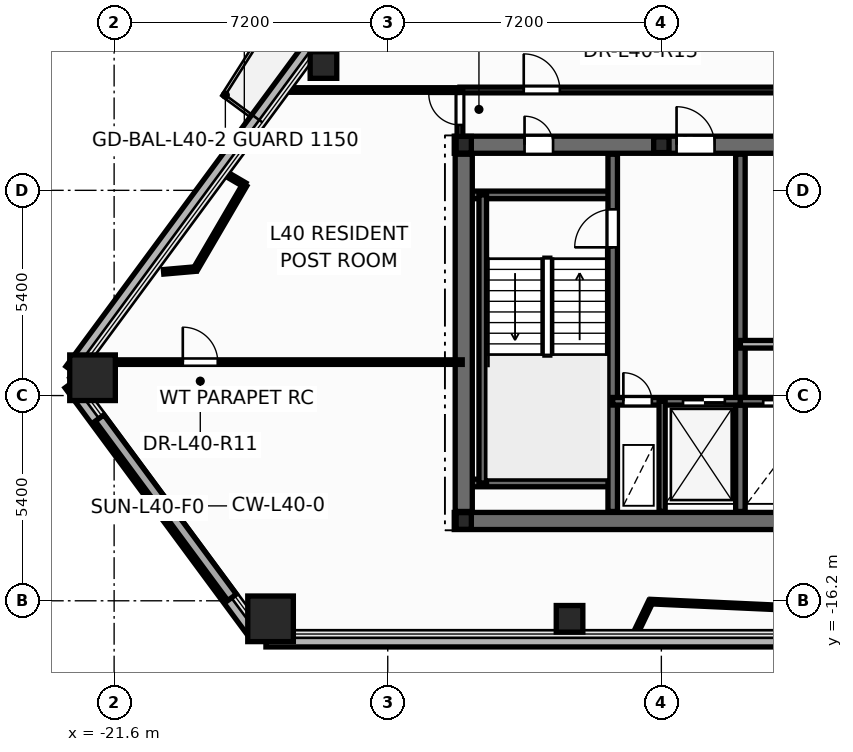
"""IFC4 building model, lengths in metres.
Left out: names, types, materials, properties, quantities, classifications, styles, units other than length and angle.
Written with IfcOpenShell. Run it as: python <this file> out.ifc"""

import sys

from ifc_helpers import new_model, si_unit, direction, frame, frame_2d, origin, origin_2d, place, context, subcontext, project, spatial, rectangle, hollow_rectangle, hollow_circle, i_section, extrude, element, fill, save


model = new_model("IFC4")
c1 = context("Model", 3, precision=1e-05, world=origin(), true_north=direction((0.0, 1.0)))
c2 = subcontext(c1, "Body", "Model", "MODEL_VIEW")
j1 = project(units=[si_unit("LENGTHUNIT", "METRE"), si_unit("PLANEANGLEUNIT", "RADIAN")], contexts=[c1])
p1 = place(None, origin())
s1 = spatial("IfcSite", under=j1, at=p1, CompositionType="ELEMENT")
p2 = place(p1, origin())
s2 = spatial("IfcBuilding", under=s1, at=p2, CompositionType="ELEMENT")
p3 = place(p2, frame((0.0, 0.0, 154.5)))
s3 = spatial("IfcBuildingStorey", under=s2, at=p3, CompositionType="ELEMENT", Elevation=154.5)
for number, where, z_axis, x_axis in (
    (1, (-22.168, -10.331, 0.0), (0.0, 0.0, 1.0), (1.0, 0.0, 0.0)),
    (2, (-17.484, -16.674, 0.0), (0.0, 0.0, 1.0), (1.0, 0.0, 0.0)),
):
    element("IfcColumn", number, at=place(p3, frame(where, z_axis=z_axis, x_axis=x_axis)), inside=s3, PredefinedType="COLUMN", context=c2, shape_type="SweptSolid", body=[
        extrude(hollow_rectangle(XDim=1.2, YDim=1.2, WallThickness=0.055, at=origin_2d()), origin(), (0.0, 0.0, 1.0), 3.6),
    ])
for number, where, z_axis, x_axis in (
    (3, (-9.616, -16.674, 0.0), (0.0, 0.0, 1.0), (1.0, 0.0, 0.0)),
    (4, (-16.092, -2.103, 0.0), (0.0, 0.0, 1.0), (1.0, 0.0, 0.0)),
):
    element("IfcColumn", number, at=place(p3, frame(where, z_axis=z_axis, x_axis=x_axis)), inside=s3, PredefinedType="COLUMN", context=c2, shape_type="SweptSolid", body=[
        extrude(hollow_circle(Radius=0.35, WallThickness=0.03, at=origin_2d()), origin(), (0.0, 0.0, 1.0), 3.6),
    ])
for number, where, z_axis, x_axis in (
    (5, (-12.4, -14.1, 0.0), (0.0, 0.0, 1.0), (1.0, 0.0, 0.0)),
    (6, (-12.4, -4.2, 0.0), (0.0, 0.0, 1.0), (1.0, 0.0, 0.0)),
):
    element("IfcColumn", number, at=place(p3, frame(where, z_axis=z_axis, x_axis=x_axis)), inside=s3, PredefinedType="COLUMN", context=c2, shape_type="SweptSolid", body=[
        extrude(i_section(OverallWidth=0.4, OverallDepth=0.44, WebThickness=0.028, FlangeThickness=0.04, at=origin_2d()), origin(), (0.0, 0.0, 1.0), 3.6),
    ])
p4 = place(p3, frame((-7.2, -4.2, 0.0), z_axis=(0.0, 0.0, 1.0), x_axis=(1.0, 0.0, 0.0)))
e7 = element("IfcColumn", 7, at=p4, inside=s3, PredefinedType="PILASTER", context=c2, shape_type="SweptSolid", body=[
    extrude(i_section(OverallWidth=0.405, OverallDepth=0.414, WebThickness=0.022, FlangeThickness=0.032, at=origin_2d()), origin(), (0.0, 0.0, 1.0), 3.6),
])
p5 = place(p3, frame((-22.747, -10.49, -0.2), z_axis=(0.0, 0.0, 1.0), x_axis=(0.594078793351, -0.804406854328, 0.0)))
e8 = element("IfcWall", 8, at=p5, inside=s3, PredefinedType="PARAPET", context=c2, shape_type="SweptSolid", body=[
    extrude(rectangle(XDim=8.223, YDim=0.36, at=frame_2d((4.111, 0.0))), origin(), (0.0, 0.0, 1.0), 0.38),
])
p6 = place(p3, frame((-17.605, -17.234, -0.2), z_axis=(0.0, 0.0, 1.0), x_axis=(1.0, 0.0, 0.0)))
e9 = element("IfcWall", 9, at=p6, inside=s3, PredefinedType="PARAPET", context=c2, shape_type="SweptSolid", body=[
    extrude(rectangle(XDim=35.211, YDim=0.36, at=frame_2d((17.605, 0.0))), origin(), (0.0, 0.0, 1.0), 0.38),
])
p7 = place(p3, frame((-13.883, 1.83, -0.2), z_axis=(0.0, 0.0, 1.0), x_axis=(-0.594082392526, -0.804404196216, 0.0)))
e10 = element("IfcWall", 10, at=p7, inside=s3, PredefinedType="PARAPET", context=c2, shape_type="SweptSolid", body=[
    extrude(rectangle(XDim=14.88, YDim=0.36, at=frame_2d((7.44, 0.0))), origin(), (0.0, 0.0, 1.0), 0.38),
])
p8 = place(p3, frame((-12.65, -14.1, 0.0), z_axis=(0.0, 0.0, 1.0), x_axis=(1.0, 0.0, 0.0)))
e11 = element("IfcWall", 11, at=p8, inside=s3, PredefinedType="SHEAR", context=c2, shape_type="SweptSolid", body=[
    extrude(rectangle(XDim=25.3, YDim=0.45, at=frame_2d((12.65, 0.0))), origin(), (0.0, 0.0, 1.0), 3.6),
])
p9 = place(p3, frame((-12.65, -4.2, 0.0), z_axis=(0.0, 0.0, 1.0), x_axis=(1.0, 0.0, 0.0)))
e12 = element("IfcWall", 12, at=p9, inside=s3, PredefinedType="SHEAR", context=c2, shape_type="SweptSolid", body=[
    extrude(rectangle(XDim=25.3, YDim=0.45, at=frame_2d((12.65, 0.0))), origin(), (0.0, 0.0, 1.0), 3.6),
])
p10 = place(p9, frame((1.85, 0.0, 0.0)))
e13 = element("IfcOpeningElement", 13, at=p10, cuts=e12, PredefinedType="OPENING", context=c2, shape_type="SweptSolid", body=[
    extrude(rectangle(XDim=0.756, YDim=2.054, at=frame_2d((0.375, 1.027))), frame((0.0, 0.235, 0.0), z_axis=(0.0, -1.0, 0.0), x_axis=(1.0, 0.0, 0.0)), (0.0, 0.0, 1.0), 0.47),
])
p11 = place(p9, frame((21.85, 0.0, 0.0)))
e14 = element("IfcOpeningElement", 14, at=p11, cuts=e12, PredefinedType="OPENING", context=c2, shape_type="SweptSolid", body=[
    extrude(rectangle(XDim=0.756, YDim=2.054, at=frame_2d((0.375, 1.027))), frame((0.0, 0.235, 0.0), z_axis=(0.0, -1.0, 0.0), x_axis=(1.0, 0.0, 0.0)), (0.0, 0.0, 1.0), 0.47),
])
p12 = place(p9, frame((23.5, 0.0, 0.0)))
e15 = element("IfcOpeningElement", 15, at=p12, cuts=e12, PredefinedType="OPENING", context=c2, shape_type="SweptSolid", body=[
    extrude(rectangle(XDim=0.756, YDim=2.054, at=frame_2d((0.375, 1.027))), frame((0.0, 0.235, 0.0), z_axis=(0.0, -1.0, 0.0), x_axis=(1.0, 0.0, 0.0)), (0.0, 0.0, 1.0), 0.47),
])
p13 = place(p9, frame((5.85, 0.0, 0.0)))
e16 = element("IfcOpeningElement", 16, at=p13, cuts=e12, PredefinedType="OPENING", context=c2, shape_type="SweptSolid", body=[
    extrude(rectangle(XDim=1.006, YDim=2.104, at=frame_2d((0.5, 1.052))), frame((0.0, 0.235, 0.0), z_axis=(0.0, -1.0, 0.0), x_axis=(1.0, 0.0, 0.0)), (0.0, 0.0, 1.0), 0.47),
])
p14 = place(p9, frame((10.35, 0.0, 0.0)))
e17 = element("IfcOpeningElement", 17, at=p14, cuts=e12, PredefinedType="OPENING", context=c2, shape_type="SweptSolid", body=[
    extrude(rectangle(XDim=1.406, YDim=2.154, at=frame_2d((0.7, 1.077))), frame((0.0, 0.235, 0.0), z_axis=(0.0, -1.0, 0.0), x_axis=(1.0, 0.0, 0.0)), (0.0, 0.0, 1.0), 0.47),
])
p15 = place(p9, frame((18.45, 0.0, 0.0)))
e18 = element("IfcOpeningElement", 18, at=p15, cuts=e12, PredefinedType="OPENING", context=c2, shape_type="SweptSolid", body=[
    extrude(rectangle(XDim=1.006, YDim=2.104, at=frame_2d((0.5, 1.052))), frame((0.0, 0.235, 0.0), z_axis=(0.0, -1.0, 0.0), x_axis=(1.0, 0.0, 0.0)), (0.0, 0.0, 1.0), 0.47),
])
for number, where, z_axis, x_axis in (
    (19, (-12.35, -5.52, 0.0), (0.0, 0.0, 1.0), (1.0, 0.0, 0.0)),
    (20, (-12.35, -13.1, 0.0), (0.0, 0.0, 1.0), (1.0, 0.0, 0.0)),
):
    element("IfcWall", number, at=place(p3, frame(where, z_axis=z_axis, x_axis=x_axis)), inside=s3, PredefinedType="SOLIDWALL", context=c2, shape_type="SweptSolid", body=[
        extrude(rectangle(XDim=3.87, YDim=0.2, at=frame_2d((1.935, 0.0))), origin(), (0.0, 0.0, 1.0), 3.6),
    ])
p16 = place(p3, frame((-11.9, -13.1, 0.0), z_axis=(0.0, 0.0, 1.0), x_axis=(0.0, 1.0, 0.0)))
e21 = element("IfcWall", 21, at=p16, inside=s3, PredefinedType="SOLIDWALL", context=c2, shape_type="SweptSolid", body=[
    extrude(rectangle(XDim=7.58, YDim=0.2, at=frame_2d((3.79, 0.0))), origin(), (0.0, 0.0, 1.0), 3.6),
])
p17 = place(p3, frame((-8.48, -13.85, 0.0), z_axis=(0.0, 0.0, 1.0), x_axis=(0.0, 1.0, 0.0)))
e22 = element("IfcWall", 22, at=p17, inside=s3, PredefinedType="SHEAR", context=c2, shape_type="SweptSolid", body=[
    extrude(rectangle(XDim=9.4, YDim=0.25, at=frame_2d((4.7, 0.0))), origin(), (0.0, 0.0, 1.0), 3.6),
])
p18 = place(p17, frame((6.95, 0.0, 0.0)))
e23 = element("IfcOpeningElement", 23, at=p18, cuts=e22, PredefinedType="OPENING", context=c2, shape_type="SweptSolid", body=[
    extrude(rectangle(XDim=1.006, YDim=2.104, at=frame_2d((0.5, 1.052))), frame((0.0, 0.135, 0.0), z_axis=(0.0, -1.0, 0.0), x_axis=(1.0, 0.0, 0.0)), (0.0, 0.0, 1.0), 0.27),
])
p19 = place(p3, frame((-5.12, -13.85, 0.0), z_axis=(0.0, 0.0, 1.0), x_axis=(0.0, 1.0, 0.0)))
e24 = element("IfcWall", 24, at=p19, inside=s3, PredefinedType="SHEAR", context=c2, shape_type="SweptSolid", body=[
    extrude(rectangle(XDim=9.4, YDim=0.25, at=frame_2d((4.7, 0.0))), origin(), (0.0, 0.0, 1.0), 3.6),
])
p20 = place(p3, frame((-8.48, -10.95, 0.0), z_axis=(0.0, 0.0, 1.0), x_axis=(1.0, 0.0, 0.0)))
e25 = element("IfcWall", 25, at=p20, inside=s3, PredefinedType="SOLIDWALL", context=c2, shape_type="SweptSolid", body=[
    extrude(rectangle(XDim=3.36, YDim=0.2, at=frame_2d((1.68, 0.0))), origin(), (0.0, 0.0, 1.0), 3.6),
])
p21 = place(p20, frame((0.28, 0.0, 0.0)))
e26 = element("IfcOpeningElement", 26, at=p21, cuts=e25, PredefinedType="OPENING", context=c2, shape_type="SweptSolid", body=[
    extrude(rectangle(XDim=0.756, YDim=2.054, at=frame_2d((0.375, 1.027))), frame((0.0, 0.11, 0.0), z_axis=(0.0, -1.0, 0.0), x_axis=(1.0, 0.0, 0.0)), (0.0, 0.0, 1.0), 0.22),
])
p22 = place(p20, frame((1.85, 0.0, 0.0)))
e27 = element("IfcOpeningElement", 27, at=p22, cuts=e25, PredefinedType="OPENING", context=c2, shape_type="SweptSolid", body=[
    extrude(rectangle(XDim=1.106, YDim=2.104, at=frame_2d((0.55, 1.052))), frame((0.0, 0.11, 0.0), z_axis=(0.0, -1.0, 0.0), x_axis=(1.0, 0.0, 0.0)), (0.0, 0.0, 1.0), 0.22),
])
p23 = place(p3, frame((-5.12, -10.95, 0.0), z_axis=(0.0, 0.0, 1.0), x_axis=(1.0, 0.0, 0.0)))
e28 = element("IfcWall", 28, at=p23, inside=s3, PredefinedType="SOLIDWALL", context=c2, shape_type="SweptSolid", body=[
    extrude(rectangle(XDim=10.24, YDim=0.2, at=frame_2d((5.12, 0.0))), origin(), (0.0, 0.0, 1.0), 3.6),
])
p24 = place(p23, frame((0.6, 0.0, 0.0)))
e29 = element("IfcOpeningElement", 29, at=p24, cuts=e28, PredefinedType="OPENING", context=c2, shape_type="SweptSolid", body=[
    extrude(rectangle(XDim=1.106, YDim=2.104, at=frame_2d((0.55, 1.052))), frame((0.0, 0.11, 0.0), z_axis=(0.0, -1.0, 0.0), x_axis=(1.0, 0.0, 0.0)), (0.0, 0.0, 1.0), 0.22),
])
p25 = place(p23, frame((2.67, 0.0, 0.0)))
e30 = element("IfcOpeningElement", 30, at=p25, cuts=e28, PredefinedType="OPENING", context=c2, shape_type="SweptSolid", body=[
    extrude(rectangle(XDim=1.106, YDim=2.104, at=frame_2d((0.55, 1.052))), frame((0.0, 0.11, 0.0), z_axis=(0.0, -1.0, 0.0), x_axis=(1.0, 0.0, 0.0)), (0.0, 0.0, 1.0), 0.22),
])
p26 = place(p23, frame((4.57, 0.0, 0.0)))
e31 = element("IfcOpeningElement", 31, at=p26, cuts=e28, PredefinedType="OPENING", context=c2, shape_type="SweptSolid", body=[
    extrude(rectangle(XDim=1.106, YDim=2.104, at=frame_2d((0.55, 1.052))), frame((0.0, 0.11, 0.0), z_axis=(0.0, -1.0, 0.0), x_axis=(1.0, 0.0, 0.0)), (0.0, 0.0, 1.0), 0.22),
])
p27 = place(p23, frame((6.47, 0.0, 0.0)))
e32 = element("IfcOpeningElement", 32, at=p27, cuts=e28, PredefinedType="OPENING", context=c2, shape_type="SweptSolid", body=[
    extrude(rectangle(XDim=1.106, YDim=2.104, at=frame_2d((0.55, 1.052))), frame((0.0, 0.11, 0.0), z_axis=(0.0, -1.0, 0.0), x_axis=(1.0, 0.0, 0.0)), (0.0, 0.0, 1.0), 0.22),
])
p28 = place(p23, frame((8.54, 0.0, 0.0)))
e33 = element("IfcOpeningElement", 33, at=p28, cuts=e28, PredefinedType="OPENING", context=c2, shape_type="SweptSolid", body=[
    extrude(rectangle(XDim=1.106, YDim=2.104, at=frame_2d((0.55, 1.052))), frame((0.0, 0.11, 0.0), z_axis=(0.0, -1.0, 0.0), x_axis=(1.0, 0.0, 0.0)), (0.0, 0.0, 1.0), 0.22),
])
p29 = place(p3, frame((-7.18, -13.85, 0.0), z_axis=(0.0, 0.0, 1.0), x_axis=(0.0, 1.0, 0.0)))
e34 = element("IfcWall", 34, at=p29, inside=s3, PredefinedType="PARTITIONING", context=c2, shape_type="SweptSolid", body=[
    extrude(rectangle(XDim=2.9, YDim=0.16, at=frame_2d((1.45, 0.0))), origin(), (0.0, 0.0, 1.0), 2.475),
])
p30 = place(p3, frame((-12.4, -13.85, 0.0), z_axis=(0.0, 0.0, 1.0), x_axis=(0.0, 1.0, 0.0)))
e35 = element("IfcWall", 35, at=p30, inside=s3, PredefinedType="SHEAR", context=c2, shape_type="SweptSolid", body=[
    extrude(rectangle(XDim=9.4, YDim=0.45, at=frame_2d((4.7, 0.0))), origin(), (0.0, 0.0, 1.0), 3.6),
])
p31 = place(p3, frame((-5.12, -9.45, 0.0), z_axis=(0.0, 0.0, 1.0), x_axis=(1.0, 0.0, 0.0)))
e36 = element("IfcWall", 36, at=p31, inside=s3, PredefinedType="SOLIDWALL", context=c2, shape_type="SweptSolid", body=[
    extrude(rectangle(XDim=2.24, YDim=0.2, at=frame_2d((1.12, 0.0))), origin(), (0.0, 0.0, 1.0), 3.35),
])
p32 = place(p3, frame((-12.5, -2.76, 0.0), z_axis=(0.0, 0.0, 1.0), x_axis=(1.0, 0.0, 0.0)))
e37 = element("IfcWall", 37, at=p32, inside=s3, PredefinedType="PARTITIONING", context=c2, shape_type="SweptSolid", body=[
    extrude(rectangle(XDim=13.14, YDim=0.15, at=frame_2d((6.57, 0.0))), origin(), (0.0, 0.0, 1.0), 2.325),
])
p33 = place(p32, frame((1.679, 0.0, 0.0)))
e38 = element("IfcOpeningElement", 38, at=p33, cuts=e37, PredefinedType="OPENING", context=c2, shape_type="SweptSolid", body=[
    extrude(rectangle(XDim=0.956, YDim=2.104, at=frame_2d((0.475, 1.052))), frame((0.0, 0.085, 0.0), z_axis=(0.0, -1.0, 0.0), x_axis=(1.0, 0.0, 0.0)), (0.0, 0.0, 1.0), 0.17),
])
p34 = place(p3, frame((-22.362, -9.92, 0.0), z_axis=(0.0, 0.0, 1.0), x_axis=(1.0, 0.0, 0.0)))
e39 = element("IfcWall", 39, at=p34, inside=s3, PredefinedType="PARTITIONING", context=c2, shape_type="SweptSolid", body=[
    extrude(rectangle(XDim=9.922, YDim=0.12, at=frame_2d((4.961, 0.0))), origin(), (0.0, 0.0, 1.0), 2.325),
])
p35 = place(p34, frame((2.569, 0.0, 0.0)))
e40 = element("IfcOpeningElement", 40, at=p35, cuts=e39, PredefinedType="OPENING", context=c2, shape_type="SweptSolid", body=[
    extrude(rectangle(XDim=0.926, YDim=2.104, at=frame_2d((0.46, 1.052))), frame((0.0, 0.07, 0.0), z_axis=(0.0, -1.0, 0.0), x_axis=(1.0, 0.0, 0.0)), (0.0, 0.0, 1.0), 0.14),
])
p36 = place(p3, frame((-17.074, -2.76, 0.0), z_axis=(0.0, 0.0, 1.0), x_axis=(1.0, 0.0, 0.0)))
e41 = element("IfcWall", 41, at=p36, inside=s3, PredefinedType="PARTITIONING", context=c2, shape_type="SweptSolid", body=[
    extrude(rectangle(XDim=4.574, YDim=0.12, at=frame_2d((2.287, 0.0))), origin(), (0.0, 0.0, 1.0), 2.792),
])
p37 = place(p3, frame((-7.48, -16.221, 0.0), z_axis=(0.0, 0.0, 1.0), x_axis=(0.998957295376, -0.045654375651, 0.0)))
e42 = element("IfcWall", 42, at=p37, inside=s3, PredefinedType="PARTITIONING", context=c2, shape_type="SweptSolid", body=[
    extrude(rectangle(XDim=4.444, YDim=0.12, at=frame_2d((2.222, 0.0))), origin(), (0.0, 0.0, 1.0), 3.35),
])
p38 = place(p3, frame((-18.162, -5.256, 0.0), z_axis=(0.0, 0.0, 1.0), x_axis=(-0.504681313398, -0.863305723314, 0.0)))
e43 = element("IfcWall", 43, at=p38, inside=s3, PredefinedType="PARTITIONING", context=c2, shape_type="SweptSolid", body=[
    extrude(rectangle(XDim=2.566, YDim=0.12, at=frame_2d((1.283, 0.0))), origin(), (0.0, 0.0, 1.0), 3.35),
])
p39 = place(p3, frame((-12.5, -4.24, 0.0), z_axis=(0.0, 0.0, 1.0), x_axis=(0.0, 1.0, 0.0)))
e44 = element("IfcWall", 44, at=p39, inside=s3, PredefinedType="PARTITIONING", context=c2, shape_type="SweptSolid", body=[
    extrude(rectangle(XDim=1.48, YDim=0.15, at=frame_2d((0.74, 0.0))), origin(), (0.0, 0.0, 1.0), 2.325),
])
p40 = place(p39, frame((0.56, 0.0, 0.0)))
e45 = element("IfcOpeningElement", 45, at=p40, cuts=e44, PredefinedType="OPENING", context=c2, shape_type="SweptSolid", body=[
    extrude(rectangle(XDim=0.826, YDim=2.104, at=frame_2d((0.41, 1.052))), frame((0.0, 0.085, 0.0), z_axis=(0.0, -1.0, 0.0), x_axis=(1.0, 0.0, 0.0)), (0.0, 0.0, 1.0), 0.17),
])
p41 = place(p3, frame((-19.457, -7.471, 0.0), z_axis=(0.0, 0.0, 1.0), x_axis=(-0.996261159798, -0.086392716583, 0.0)))
e46 = element("IfcWall", 46, at=p41, inside=s3, PredefinedType="PARTITIONING", context=c2, shape_type="SweptSolid", body=[
    extrude(rectangle(XDim=0.845, YDim=0.12, at=frame_2d((0.422, 0.0))), origin(), (0.0, 0.0, 1.0), 2.792),
])
p42 = place(p3, frame((-7.844, -16.978, 0.0), z_axis=(0.0, 0.0, 1.0), x_axis=(0.432721607122, 0.901527598429, 0.0)))
e47 = element("IfcWall", 47, at=p42, inside=s3, PredefinedType="PARTITIONING", context=c2, shape_type="SweptSolid", body=[
    extrude(rectangle(XDim=0.839, YDim=0.12, at=frame_2d((0.419, 0.0))), origin(), (0.0, 0.0, 1.0), 2.792),
])
p43 = place(p3, frame((-18.681, -4.953, 0.0), z_axis=(0.0, 0.0, 1.0), x_axis=(0.863277740544, -0.504729177561, 0.0)))
e48 = element("IfcWall", 48, at=p43, inside=s3, PredefinedType="PARTITIONING", context=c2, shape_type="SweptSolid", body=[
    extrude(rectangle(XDim=0.601, YDim=0.12, at=frame_2d((0.301, 0.0))), origin(), (0.0, 0.0, 1.0), 2.792),
])
p44 = place(p18, origin())
e49 = element("IfcDoor", 49, at=p44, inside=s3, OperationType="SINGLE_SWING_LEFT", PredefinedType="DOOR", context=c2, shape_type="SweptSolid", body=[
    extrude(rectangle(XDim=1.0, YDim=2.1, at=frame_2d((0.5, 1.05))), frame((0.0, 0.025, 0.0), z_axis=(0.0, -1.0, 0.0), x_axis=(1.0, 0.0, 0.0)), (0.0, 0.0, 1.0), 0.05),
])
fill(e23, e49)
p45 = place(p21, origin())
e50 = element("IfcDoor", 50, at=p45, inside=s3, OperationType="SINGLE_SWING_LEFT", PredefinedType="DOOR", context=c2, shape_type="SweptSolid", body=[
    extrude(rectangle(XDim=0.75, YDim=2.05, at=frame_2d((0.375, 1.025))), frame((0.0, 0.025, 0.0), z_axis=(0.0, -1.0, 0.0), x_axis=(1.0, 0.0, 0.0)), (0.0, 0.0, 1.0), 0.05),
])
fill(e26, e50)
p46 = place(p22, origin())
e51 = element("IfcDoor", 51, at=p46, inside=s3, OperationType="DOUBLE_DOOR_SLIDING", PredefinedType="DOOR", context=c2, shape_type="SweptSolid", body=[
    extrude(rectangle(XDim=1.1, YDim=2.1, at=frame_2d((0.55, 1.05))), frame((0.0, 0.025, 0.0), z_axis=(0.0, -1.0, 0.0), x_axis=(1.0, 0.0, 0.0)), (0.0, 0.0, 1.0), 0.05),
])
fill(e27, e51)
p47 = place(p24, origin())
e52 = element("IfcDoor", 52, at=p47, inside=s3, OperationType="DOUBLE_DOOR_SLIDING", PredefinedType="DOOR", context=c2, shape_type="SweptSolid", body=[
    extrude(rectangle(XDim=1.1, YDim=2.1, at=frame_2d((0.55, 1.05))), frame((0.0, 0.025, 0.0), z_axis=(0.0, -1.0, 0.0), x_axis=(1.0, 0.0, 0.0)), (0.0, 0.0, 1.0), 0.05),
])
fill(e29, e52)
p48 = place(p10, origin())
e53 = element("IfcDoor", 53, at=p48, inside=s3, OperationType="SINGLE_SWING_LEFT", PredefinedType="DOOR", context=c2, shape_type="SweptSolid", body=[
    extrude(rectangle(XDim=0.75, YDim=2.05, at=frame_2d((0.375, 1.025))), frame((0.0, 0.025, 0.0), z_axis=(0.0, -1.0, 0.0), x_axis=(1.0, 0.0, 0.0)), (0.0, 0.0, 1.0), 0.05),
])
fill(e13, e53)
p49 = place(p13, origin())
e54 = element("IfcDoor", 54, at=p49, inside=s3, OperationType="SINGLE_SWING_LEFT", PredefinedType="DOOR", context=c2, shape_type="SweptSolid", body=[
    extrude(rectangle(XDim=1.0, YDim=2.1, at=frame_2d((0.5, 1.05))), frame((0.0, 0.025, 0.0), z_axis=(0.0, -1.0, 0.0), x_axis=(1.0, 0.0, 0.0)), (0.0, 0.0, 1.0), 0.05),
])
fill(e16, e54)
p50 = place(p35, origin())
e55 = element("IfcDoor", 55, at=p50, inside=s3, OperationType="SINGLE_SWING_LEFT", PredefinedType="DOOR", context=c2, shape_type="SweptSolid", body=[
    extrude(rectangle(XDim=0.92, YDim=2.1, at=frame_2d((0.46, 1.05))), frame((0.0, 0.025, 0.0), z_axis=(0.0, -1.0, 0.0), x_axis=(1.0, 0.0, 0.0)), (0.0, 0.0, 1.0), 0.05),
])
fill(e40, e55)
p51 = place(p40, origin())
e56 = element("IfcDoor", 56, at=p51, inside=s3, OperationType="SINGLE_SWING_RIGHT", PredefinedType="DOOR", context=c2, shape_type="SweptSolid", body=[
    extrude(rectangle(XDim=0.82, YDim=2.1, at=frame_2d((0.41, 1.05))), frame((0.0, 0.025, 0.0), z_axis=(0.0, -1.0, 0.0), x_axis=(1.0, 0.0, 0.0)), (0.0, 0.0, 1.0), 0.05),
])
fill(e45, e56)
p52 = place(p33, origin())
e57 = element("IfcDoor", 57, at=p52, inside=s3, OperationType="SINGLE_SWING_LEFT", PredefinedType="DOOR", context=c2, shape_type="SweptSolid", body=[
    extrude(rectangle(XDim=0.95, YDim=2.1, at=frame_2d((0.475, 1.05))), frame((0.0, 0.025, 0.0), z_axis=(0.0, -1.0, 0.0), x_axis=(1.0, 0.0, 0.0)), (0.0, 0.0, 1.0), 0.05),
])
fill(e38, e57)
save(model, sys.argv[1])
